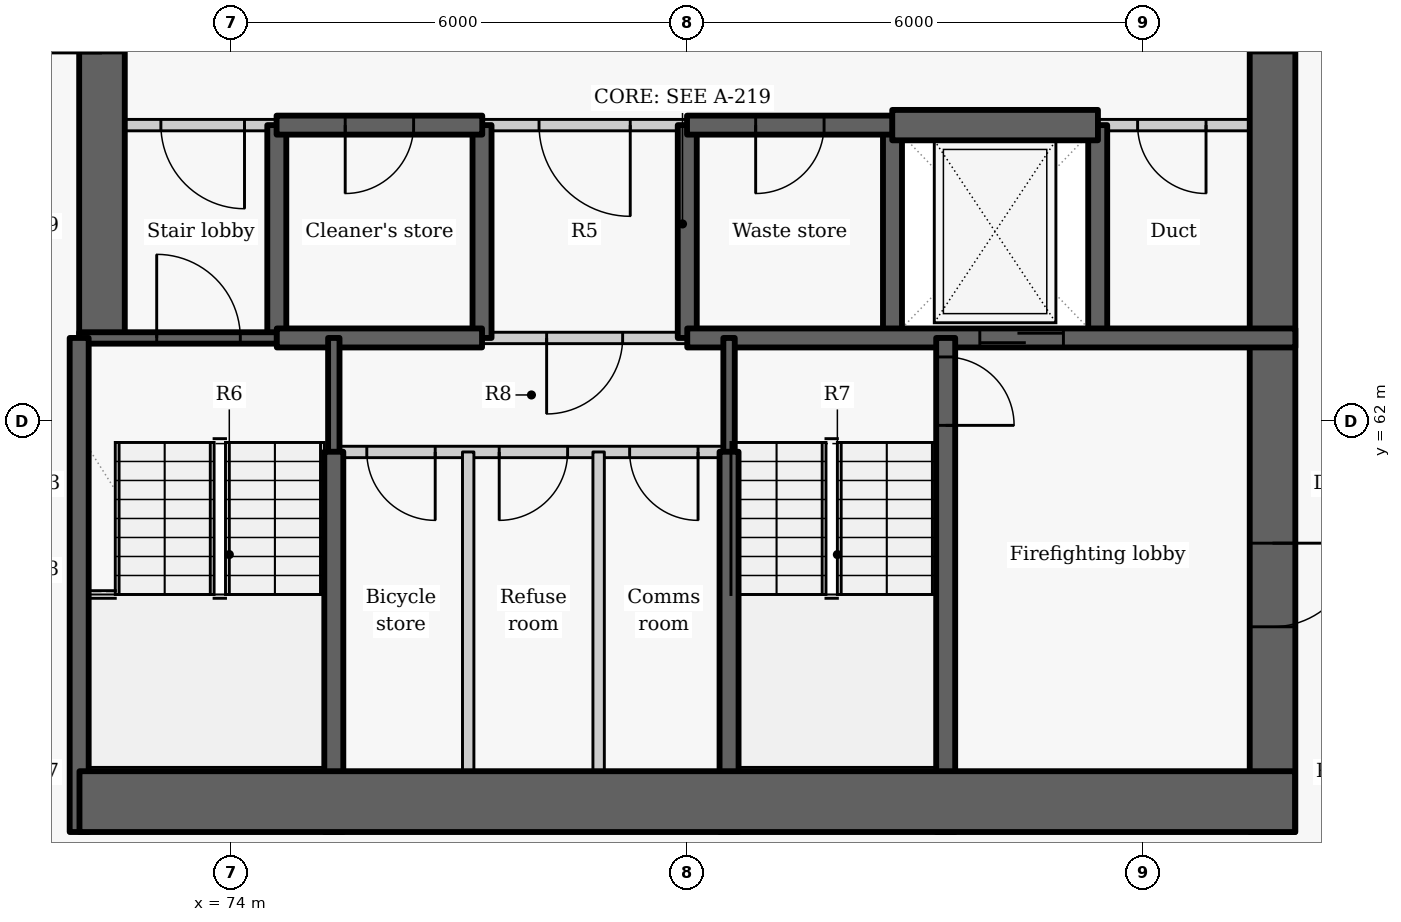
"""IFC4 building model, lengths in metres.
Left out: names, types, materials, properties, quantities, classifications, styles, units other than length and angle.
Written with IfcOpenShell. Run it as: python <this file> out.ifc"""

import sys

from ifc_helpers import new_model, si_unit, direction, frame, frame_2d, origin, place, context, subcontext, project, spatial, rectangle, extrude, element, fill, save


model = new_model("IFC4")
c1 = context("Model", 3, precision=1e-05, world=origin(), true_north=direction((0.0, 1.0)))
c2 = subcontext(c1, "Body", "Model", "MODEL_VIEW")
j1 = project(units=[si_unit("LENGTHUNIT", "METRE"), si_unit("PLANEANGLEUNIT", "RADIAN")], contexts=[c1])
p1 = place(None, origin())
s1 = spatial("IfcSite", under=j1, at=p1, CompositionType="ELEMENT")
p2 = place(p1, origin())
s2 = spatial("IfcBuilding", under=s1, at=p2, CompositionType="ELEMENT")
p3 = place(p2, frame((0.0, 0.0, 97.5)))
s3 = spatial("IfcBuildingStorey", under=s2, at=p3, CompositionType="ELEMENT", Elevation=97.5)
p4 = place(p3, frame((74.6, 63.1, -0.275), z_axis=(0.0, 0.0, 1.0), x_axis=(0.0, 1.0, 0.0)))
e1 = element("IfcWall", 1, at=p4, inside=s3, PredefinedType="SHEAR", context=c2, shape_type="SweptSolid", body=[
    extrude(rectangle(XDim=2.8, YDim=0.25, at=frame_2d((1.4, 0.0))), origin(), (0.0, 0.0, 1.0), 3.3),
])
p5 = place(p3, frame((72.3, 63.1, -0.275), z_axis=(0.0, 0.0, 1.0), x_axis=(0.0, 1.0, 0.0)))
e2 = element("IfcWall", 2, at=p5, inside=s3, PredefinedType="SHEAR", context=c2, shape_type="SweptSolid", body=[
    extrude(rectangle(XDim=9.1, YDim=0.6, at=frame_2d((4.55, 0.0))), origin(), (0.0, 0.0, 1.0), 3.3),
])
p6 = place(p5, frame((3.75, 0.0, 0.275)))
e3 = element("IfcOpeningElement", 3, at=p6, cuts=e2, PredefinedType="OPENING", context=c2, shape_type="SweptSolid", body=[
    extrude(rectangle(XDim=1.5, YDim=2.1, at=frame_2d((0.75, 1.05))), frame((0.0, 0.31, 0.0), z_axis=(0.0, -1.0, 0.0), x_axis=(1.0, 0.0, 0.0)), (0.0, 0.0, 1.0), 0.62),
])
for number, where, z_axis, x_axis in (
    (4, (77.3, 63.1, -0.275), (0.0, 0.0, 1.0), (0.0, 1.0, 0.0)),
    (5, (80.0, 63.1, -0.275), (0.0, 0.0, 1.0), (0.0, 1.0, 0.0)),
    (6, (82.7, 63.1, -0.275), (0.0, 0.0, 1.0), (0.0, 1.0, 0.0)),
    (7, (85.4, 63.1, -0.275), (0.0, 0.0, 1.0), (0.0, 1.0, 0.0)),
):
    element("IfcWall", number, at=place(p3, frame(where, z_axis=z_axis, x_axis=x_axis)), inside=s3, PredefinedType="SHEAR", context=c2, shape_type="SweptSolid", body=[
        extrude(rectangle(XDim=2.8, YDim=0.25, at=frame_2d((1.4, 0.0))), origin(), (0.0, 0.0, 1.0), 3.3),
    ])
p7 = place(p3, frame((87.7, 72.2, -0.275), z_axis=(0.0, 0.0, 1.0), x_axis=(0.0, -1.0, 0.0)))
e8 = element("IfcWall", 8, at=p7, inside=s3, PredefinedType="SHEAR", context=c2, shape_type="SweptSolid", body=[
    extrude(rectangle(XDim=15.6, YDim=0.6, at=frame_2d((7.8, 0.0))), origin(), (0.0, 0.0, 1.0), 3.3),
])
p8 = place(p7, frame((3.85, 0.0, 0.275)))
e9 = element("IfcOpeningElement", 9, at=p8, cuts=e8, PredefinedType="OPENING", context=c2, shape_type="SweptSolid", body=[
    extrude(rectangle(XDim=1.5, YDim=2.1, at=frame_2d((0.75, 1.05))), frame((0.0, 0.31, 0.0), z_axis=(0.0, -1.0, 0.0), x_axis=(1.0, 0.0, 0.0)), (0.0, 0.0, 1.0), 0.62),
])
p9 = place(p7, frame((11.8, 0.0, 0.275)))
e10 = element("IfcOpeningElement", 10, at=p9, cuts=e8, PredefinedType="OPENING", context=c2, shape_type="SweptSolid", body=[
    extrude(rectangle(XDim=1.1, YDim=2.1, at=frame_2d((0.55, 1.05))), frame((0.0, 0.31, 0.0), z_axis=(0.0, -1.0, 0.0), x_axis=(1.0, 0.0, 0.0)), (0.0, 0.0, 1.0), 0.62),
])
p10 = place(p3, frame((74.603, 65.9, 0.0), z_axis=(0.0, 0.0, 1.0), x_axis=(-1.0, 0.0, 0.0)))
e11 = element("IfcWall", 11, at=p10, inside=s3, PredefinedType="PARTITIONING", context=c2, shape_type="SweptSolid", body=[
    extrude(rectangle(XDim=2.603, YDim=0.15, at=frame_2d((1.302, 0.0))), origin(), (0.0, 0.0, 1.0), 3.025),
])
p11 = place(p10, frame((0.428, 0.0, 0.0)))
e12 = element("IfcOpeningElement", 12, at=p11, cuts=e11, PredefinedType="OPENING", context=c2, shape_type="SweptSolid", body=[
    extrude(rectangle(XDim=1.1, YDim=2.1, at=frame_2d((0.55, 1.05))), frame((0.0, 0.085, 0.0), z_axis=(0.0, -1.0, 0.0), x_axis=(1.0, 0.0, 0.0)), (0.0, 0.0, 1.0), 0.17),
])
p12 = place(p3, frame((80.003, 65.9, 0.0), z_axis=(0.0, 0.0, 1.0), x_axis=(-1.0, 0.0, 0.0)))
e13 = element("IfcWall", 13, at=p12, inside=s3, PredefinedType="PARTITIONING", context=c2, shape_type="SweptSolid", body=[
    extrude(rectangle(XDim=2.706, YDim=0.15, at=frame_2d((1.353, 0.0))), origin(), (0.0, 0.0, 1.0), 3.025),
])
p13 = place(p12, frame((0.753, 0.0, 0.0)))
e14 = element("IfcOpeningElement", 14, at=p13, cuts=e13, PredefinedType="OPENING", context=c2, shape_type="SweptSolid", body=[
    extrude(rectangle(XDim=1.2, YDim=2.1, at=frame_2d((0.6, 1.05))), frame((0.0, 0.085, 0.0), z_axis=(0.0, -1.0, 0.0), x_axis=(1.0, 0.0, 0.0)), (0.0, 0.0, 1.0), 0.17),
])
p14 = place(p3, frame((88.0, 65.9, 0.0), z_axis=(0.0, 0.0, 1.0), x_axis=(-1.0, 0.0, 0.0)))
e15 = element("IfcWall", 15, at=p14, inside=s3, PredefinedType="PARTITIONING", context=c2, shape_type="SweptSolid", body=[
    extrude(rectangle(XDim=2.603, YDim=0.15, at=frame_2d((1.302, 0.0))), origin(), (0.0, 0.0, 1.0), 3.025),
])
p15 = place(p14, frame((1.175, 0.0, 0.0)))
e16 = element("IfcOpeningElement", 16, at=p15, cuts=e15, PredefinedType="OPENING", context=c2, shape_type="SweptSolid", body=[
    extrude(rectangle(XDim=0.9, YDim=2.1, at=frame_2d((0.45, 1.05))), frame((0.0, 0.085, 0.0), z_axis=(0.0, -1.0, 0.0), x_axis=(1.0, 0.0, 0.0)), (0.0, 0.0, 1.0), 0.17),
])
p16 = place(p3, frame((77.303, 65.9, -0.275), z_axis=(0.0, 0.0, 1.0), x_axis=(-1.0, 0.0, 0.0)))
e17 = element("IfcWall", 17, at=p16, inside=s3, PredefinedType="SHEAR", context=c2, shape_type="SweptSolid", body=[
    extrude(rectangle(XDim=2.706, YDim=0.25, at=frame_2d((1.353, 0.0))), origin(), (0.0, 0.0, 1.0), 3.3),
])
p17 = place(p16, frame((0.903, 0.0, 0.275)))
e18 = element("IfcOpeningElement", 18, at=p17, cuts=e17, PredefinedType="OPENING", context=c2, shape_type="SweptSolid", body=[
    extrude(rectangle(XDim=0.9, YDim=2.1, at=frame_2d((0.45, 1.05))), frame((0.0, 0.135, 0.0), z_axis=(0.0, -1.0, 0.0), x_axis=(1.0, 0.0, 0.0)), (0.0, 0.0, 1.0), 0.27),
])
p18 = place(p3, frame((82.703, 65.9, -0.275), z_axis=(0.0, 0.0, 1.0), x_axis=(-1.0, 0.0, 0.0)))
e19 = element("IfcWall", 19, at=p18, inside=s3, PredefinedType="SHEAR", context=c2, shape_type="SweptSolid", body=[
    extrude(rectangle(XDim=2.706, YDim=0.25, at=frame_2d((1.353, 0.0))), origin(), (0.0, 0.0, 1.0), 3.3),
])
p19 = place(p18, frame((0.903, 0.0, 0.275)))
e20 = element("IfcOpeningElement", 20, at=p19, cuts=e19, PredefinedType="OPENING", context=c2, shape_type="SweptSolid", body=[
    extrude(rectangle(XDim=0.9, YDim=2.1, at=frame_2d((0.45, 1.05))), frame((0.0, 0.135, 0.0), z_axis=(0.0, -1.0, 0.0), x_axis=(1.0, 0.0, 0.0)), (0.0, 0.0, 1.0), 0.27),
])
p20 = place(p3, frame((82.697, 65.9, -0.275), z_axis=(0.0, 0.0, 1.0), x_axis=(1.0, 0.0, 0.0)))
e21 = element("IfcWall", 21, at=p20, inside=s3, PredefinedType="SHEAR", context=c2, shape_type="SweptSolid", body=[
    extrude(rectangle(XDim=2.706, YDim=0.4, at=frame_2d((1.353, 0.0))), origin(), (0.0, 0.0, 1.0), 3.3),
])
p21 = place(p3, frame((72.0, 63.1, -0.275), z_axis=(0.0, 0.0, 1.0), x_axis=(1.0, 0.0, 0.0)))
e22 = element("IfcWall", 22, at=p21, inside=s3, PredefinedType="SHEAR", context=c2, shape_type="SweptSolid", body=[
    extrude(rectangle(XDim=2.6, YDim=0.15, at=frame_2d((1.3, 0.0))), origin(), (0.0, 0.0, 1.0), 3.3),
])
p22 = place(p21, frame((1.02, 0.0, 0.275)))
e23 = element("IfcOpeningElement", 23, at=p22, cuts=e22, PredefinedType="OPENING", context=c2, shape_type="SweptSolid", body=[
    extrude(rectangle(XDim=1.1, YDim=2.1, at=frame_2d((0.55, 1.05))), frame((0.0, 0.085, 0.0), z_axis=(0.0, -1.0, 0.0), x_axis=(1.0, 0.0, 0.0)), (0.0, 0.0, 1.0), 0.17),
])
p23 = place(p3, frame((74.6, 63.1, -0.275), z_axis=(0.0, 0.0, 1.0), x_axis=(1.0, 0.0, 0.0)))
e24 = element("IfcWall", 24, at=p23, inside=s3, PredefinedType="SHEAR", context=c2, shape_type="SweptSolid", body=[
    extrude(rectangle(XDim=2.7, YDim=0.25, at=frame_2d((1.35, 0.0))), origin(), (0.0, 0.0, 1.0), 3.3),
])
p24 = place(p3, frame((80.0, 63.1, -0.275), z_axis=(0.0, 0.0, 1.0), x_axis=(1.0, 0.0, 0.0)))
e25 = element("IfcWall", 25, at=p24, inside=s3, PredefinedType="SHEAR", context=c2, shape_type="SweptSolid", body=[
    extrude(rectangle(XDim=8.0, YDim=0.25, at=frame_2d((4.0, 0.0))), origin(), (0.0, 0.0, 1.0), 3.3),
])
p25 = place(p24, frame((3.849, 0.0, 0.275)))
e26 = element("IfcOpeningElement", 26, at=p25, cuts=e25, PredefinedType="OPENING", context=c2, shape_type="SweptSolid", body=[
    extrude(rectangle(XDim=1.1, YDim=2.1, at=frame_2d((0.55, 1.05))), frame((0.0, 0.135, 0.0), z_axis=(0.0, -1.0, 0.0), x_axis=(1.0, 0.0, 0.0)), (0.0, 0.0, 1.0), 0.27),
])
p26 = place(p3, frame((80.0, 63.1, 0.0), z_axis=(0.0, 0.0, 1.0), x_axis=(-1.0, 0.0, 0.0)))
e27 = element("IfcWall", 27, at=p26, inside=s3, PredefinedType="PARTITIONING", context=c2, shape_type="SweptSolid", body=[
    extrude(rectangle(XDim=2.7, YDim=0.15, at=frame_2d((1.35, 0.0))), origin(), (0.0, 0.0, 1.0), 3.025),
])
p27 = place(p26, frame((0.85, 0.0, 0.0)))
e28 = element("IfcOpeningElement", 28, at=p27, cuts=e27, PredefinedType="OPENING", context=c2, shape_type="SweptSolid", body=[
    extrude(rectangle(XDim=1.0, YDim=2.1, at=frame_2d((0.5, 1.05))), frame((0.0, 0.085, 0.0), z_axis=(0.0, -1.0, 0.0), x_axis=(1.0, 0.0, 0.0)), (0.0, 0.0, 1.0), 0.17),
])
p28 = place(p3, frame((75.35, 61.597, -0.275), z_axis=(0.0, 0.0, 1.0), x_axis=(0.0, 1.0, 0.0)))
e29 = element("IfcWall", 29, at=p28, inside=s3, PredefinedType="SHEAR", context=c2, shape_type="SweptSolid", body=[
    extrude(rectangle(XDim=1.503, YDim=0.15, at=frame_2d((0.751, 0.0))), origin(), (0.0, 0.0, 1.0), 3.3),
])
p29 = place(p3, frame((75.35, 56.6, -0.275), z_axis=(0.0, 0.0, 1.0), x_axis=(0.0, 1.0, 0.0)))
e30 = element("IfcWall", 30, at=p29, inside=s3, PredefinedType="SHEAR", context=c2, shape_type="SweptSolid", body=[
    extrude(rectangle(XDim=5.003, YDim=0.25, at=frame_2d((2.501, 0.0))), origin(), (0.0, 0.0, 1.0), 3.3),
])
p30 = place(p3, frame((72.0, 56.6, -0.275), z_axis=(0.0, 0.0, 1.0), x_axis=(0.0, 1.0, 0.0)))
e31 = element("IfcWall", 31, at=p30, inside=s3, PredefinedType="SHEAR", context=c2, shape_type="SweptSolid", body=[
    extrude(rectangle(XDim=6.5, YDim=0.25, at=frame_2d((3.25, 0.0))), origin(), (0.0, 0.0, 1.0), 3.3),
])
p31 = place(p3, frame((83.4, 63.1, -0.275), z_axis=(0.0, 0.0, 1.0), x_axis=(0.0, -1.0, 0.0)))
e32 = element("IfcWall", 32, at=p31, inside=s3, PredefinedType="SHEAR", context=c2, shape_type="SweptSolid", body=[
    extrude(rectangle(XDim=6.5, YDim=0.25, at=frame_2d((3.25, 0.0))), origin(), (0.0, 0.0, 1.0), 3.3),
])
p32 = place(p31, frame((0.25, 0.0, 0.275)))
e33 = element("IfcOpeningElement", 33, at=p32, cuts=e32, PredefinedType="OPENING", context=c2, shape_type="SweptSolid", body=[
    extrude(rectangle(XDim=0.9, YDim=2.1, at=frame_2d((0.45, 1.05))), frame((0.0, 0.135, 0.0), z_axis=(0.0, -1.0, 0.0), x_axis=(1.0, 0.0, 0.0)), (0.0, 0.0, 1.0), 0.27),
])
p33 = place(p3, frame((80.55, 61.597, -0.275), z_axis=(0.0, 0.0, 1.0), x_axis=(0.0, 1.0, 0.0)))
e34 = element("IfcWall", 34, at=p33, inside=s3, PredefinedType="SHEAR", context=c2, shape_type="SweptSolid", body=[
    extrude(rectangle(XDim=1.503, YDim=0.15, at=frame_2d((0.751, 0.0))), origin(), (0.0, 0.0, 1.0), 3.3),
])
p34 = place(p3, frame((80.55, 56.6, -0.275), z_axis=(0.0, 0.0, 1.0), x_axis=(0.0, 1.0, 0.0)))
e35 = element("IfcWall", 35, at=p34, inside=s3, PredefinedType="SHEAR", context=c2, shape_type="SweptSolid", body=[
    extrude(rectangle(XDim=5.003, YDim=0.25, at=frame_2d((2.501, 0.0))), origin(), (0.0, 0.0, 1.0), 3.3),
])
p35 = place(p3, frame((80.55, 61.6, 0.0), z_axis=(0.0, 0.0, 1.0), x_axis=(-1.0, 0.0, 0.0)))
e36 = element("IfcWall", 36, at=p35, inside=s3, PredefinedType="PARTITIONING", context=c2, shape_type="SweptSolid", body=[
    extrude(rectangle(XDim=5.2, YDim=0.15, at=frame_2d((2.6, 0.0))), origin(), (0.0, 0.0, 1.0), 3.025),
])
p36 = place(p35, frame((3.866, 0.0, 0.0)))
e37 = element("IfcOpeningElement", 37, at=p36, cuts=e36, PredefinedType="OPENING", context=c2, shape_type="SweptSolid", body=[
    extrude(rectangle(XDim=0.9, YDim=2.1, at=frame_2d((0.45, 1.05))), frame((0.0, 0.085, 0.0), z_axis=(0.0, -1.0, 0.0), x_axis=(1.0, 0.0, 0.0)), (0.0, 0.0, 1.0), 0.17),
])
p37 = place(p35, frame((2.124, 0.0, 0.0)))
e38 = element("IfcOpeningElement", 38, at=p37, cuts=e36, PredefinedType="OPENING", context=c2, shape_type="SweptSolid", body=[
    extrude(rectangle(XDim=0.9, YDim=2.1, at=frame_2d((0.45, 1.05))), frame((0.0, 0.085, 0.0), z_axis=(0.0, -1.0, 0.0), x_axis=(1.0, 0.0, 0.0)), (0.0, 0.0, 1.0), 0.17),
])
p38 = place(p35, frame((0.408, 0.0, 0.0)))
e39 = element("IfcOpeningElement", 39, at=p38, cuts=e36, PredefinedType="OPENING", context=c2, shape_type="SweptSolid", body=[
    extrude(rectangle(XDim=0.9, YDim=2.1, at=frame_2d((0.45, 1.05))), frame((0.0, 0.085, 0.0), z_axis=(0.0, -1.0, 0.0), x_axis=(1.0, 0.0, 0.0)), (0.0, 0.0, 1.0), 0.17),
])
for number, where, z_axis, x_axis in (
    (40, (77.118, 56.6, 0.0), (0.0, 0.0, 1.0), (0.0, 1.0, 0.0)),
    (41, (78.834, 56.6, 0.0), (0.0, 0.0, 1.0), (0.0, 1.0, 0.0)),
):
    element("IfcWall", number, at=place(p3, frame(where, z_axis=z_axis, x_axis=x_axis)), inside=s3, PredefinedType="PARTITIONING", context=c2, shape_type="SweptSolid", body=[
        extrude(rectangle(XDim=5.0, YDim=0.15, at=frame_2d((2.5, 0.0))), origin(), (0.0, 0.0, 1.0), 3.025),
    ])
p39 = place(p3, frame((72.004, 57.0, -0.275), z_axis=(0.0, 0.0, 1.0), x_axis=(1.0, 0.0, 0.0)))
e42 = element("IfcWall", 42, at=p39, inside=s3, PredefinedType="SHEAR", context=c2, shape_type="SweptSolid", body=[
    extrude(rectangle(XDim=15.992, YDim=0.8, at=frame_2d((7.996, 0.0))), origin(), (0.0, 0.0, 1.0), 3.3),
])
p40 = place(p11, origin())
e43 = element("IfcDoor", 43, at=p40, inside=s3, OperationType="SINGLE_SWING_LEFT", PredefinedType="DOOR", context=c2, shape_type="SweptSolid", body=[
    extrude(rectangle(XDim=1.1, YDim=2.1, at=frame_2d((0.55, 1.05))), frame((0.0, 0.025, 0.0), z_axis=(0.0, -1.0, 0.0), x_axis=(1.0, 0.0, 0.0)), (0.0, 0.0, 1.0), 0.05),
])
fill(e12, e43)
p41 = place(p17, origin())
e44 = element("IfcDoor", 44, at=p41, inside=s3, OperationType="SINGLE_SWING_RIGHT", PredefinedType="DOOR", context=c2, shape_type="SweptSolid", body=[
    extrude(rectangle(XDim=0.9, YDim=2.1, at=frame_2d((0.45, 1.05))), frame((0.0, 0.025, 0.0), z_axis=(0.0, -1.0, 0.0), x_axis=(1.0, 0.0, 0.0)), (0.0, 0.0, 1.0), 0.05),
])
fill(e18, e44)
p42 = place(p13, origin())
e45 = element("IfcDoor", 45, at=p42, inside=s3, OperationType="DOUBLE_DOOR_SINGLE_SWING", PredefinedType="DOOR", context=c2, shape_type="SweptSolid", body=[
    extrude(rectangle(XDim=1.2, YDim=2.1, at=frame_2d((0.6, 1.05))), frame((0.0, 0.025, 0.0), z_axis=(0.0, -1.0, 0.0), x_axis=(1.0, 0.0, 0.0)), (0.0, 0.0, 1.0), 0.05),
])
fill(e14, e45)
p43 = place(p19, origin())
e46 = element("IfcDoor", 46, at=p43, inside=s3, OperationType="SINGLE_SWING_RIGHT", PredefinedType="DOOR", context=c2, shape_type="SweptSolid", body=[
    extrude(rectangle(XDim=0.9, YDim=2.1, at=frame_2d((0.45, 1.05))), frame((0.0, 0.025, 0.0), z_axis=(0.0, -1.0, 0.0), x_axis=(1.0, 0.0, 0.0)), (0.0, 0.0, 1.0), 0.05),
])
fill(e20, e46)
p44 = place(p25, origin())
e47 = element("IfcDoor", 47, at=p44, inside=s3, OperationType="SLIDING_TO_LEFT", PredefinedType="DOOR", context=c2, shape_type="SweptSolid", body=[
    extrude(rectangle(XDim=1.1, YDim=2.1, at=frame_2d((0.55, 1.05))), frame((0.0, 0.025, 0.0), z_axis=(0.0, -1.0, 0.0), x_axis=(1.0, 0.0, 0.0)), (0.0, 0.0, 1.0), 0.05),
])
fill(e26, e47)
p45 = place(p15, origin())
e48 = element("IfcDoor", 48, at=p45, inside=s3, OperationType="SINGLE_SWING_LEFT", PredefinedType="DOOR", context=c2, shape_type="SweptSolid", body=[
    extrude(rectangle(XDim=0.9, YDim=2.1, at=frame_2d((0.45, 1.05))), frame((0.0, 0.025, 0.0), z_axis=(0.0, -1.0, 0.0), x_axis=(1.0, 0.0, 0.0)), (0.0, 0.0, 1.0), 0.05),
])
fill(e16, e48)
p46 = place(p27, origin())
e49 = element("IfcDoor", 49, at=p46, inside=s3, OperationType="SINGLE_SWING_RIGHT", PredefinedType="DOOR", context=c2, shape_type="SweptSolid", body=[
    extrude(rectangle(XDim=1.0, YDim=2.1, at=frame_2d((0.5, 1.05))), frame((0.0, 0.025, 0.0), z_axis=(0.0, -1.0, 0.0), x_axis=(1.0, 0.0, 0.0)), (0.0, 0.0, 1.0), 0.05),
])
fill(e28, e49)
p47 = place(p36, origin())
e50 = element("IfcDoor", 50, at=p47, inside=s3, OperationType="SINGLE_SWING_LEFT", PredefinedType="DOOR", context=c2, shape_type="SweptSolid", body=[
    extrude(rectangle(XDim=0.9, YDim=2.1, at=frame_2d((0.45, 1.05))), frame((0.0, 0.025, 0.0), z_axis=(0.0, -1.0, 0.0), x_axis=(1.0, 0.0, 0.0)), (0.0, 0.0, 1.0), 0.05),
])
fill(e37, e50)
p48 = place(p37, origin())
e51 = element("IfcDoor", 51, at=p48, inside=s3, OperationType="SINGLE_SWING_RIGHT", PredefinedType="DOOR", context=c2, shape_type="SweptSolid", body=[
    extrude(rectangle(XDim=0.9, YDim=2.1, at=frame_2d((0.45, 1.05))), frame((0.0, 0.025, 0.0), z_axis=(0.0, -1.0, 0.0), x_axis=(1.0, 0.0, 0.0)), (0.0, 0.0, 1.0), 0.05),
])
fill(e38, e51)
p49 = place(p38, origin())
e52 = element("IfcDoor", 52, at=p49, inside=s3, OperationType="SINGLE_SWING_LEFT", PredefinedType="DOOR", context=c2, shape_type="SweptSolid", body=[
    extrude(rectangle(XDim=0.9, YDim=2.1, at=frame_2d((0.45, 1.05))), frame((0.0, 0.025, 0.0), z_axis=(0.0, -1.0, 0.0), x_axis=(1.0, 0.0, 0.0)), (0.0, 0.0, 1.0), 0.05),
])
fill(e39, e52)
p50 = place(p22, origin())
e53 = element("IfcDoor", 53, at=p50, inside=s3, OperationType="SINGLE_SWING_LEFT", PredefinedType="DOOR", context=c2, shape_type="SweptSolid", body=[
    extrude(rectangle(XDim=1.1, YDim=2.1, at=frame_2d((0.55, 1.05))), frame((0.0, 0.025, 0.0), z_axis=(0.0, -1.0, 0.0), x_axis=(1.0, 0.0, 0.0)), (0.0, 0.0, 1.0), 0.05),
])
fill(e23, e53)
p51 = place(p32, origin())
e54 = element("IfcDoor", 54, at=p51, inside=s3, OperationType="SINGLE_SWING_RIGHT", PredefinedType="DOOR", context=c2, shape_type="SweptSolid", body=[
    extrude(rectangle(XDim=0.9, YDim=2.1, at=frame_2d((0.45, 1.05))), frame((0.0, 0.025, 0.0), z_axis=(0.0, -1.0, 0.0), x_axis=(1.0, 0.0, 0.0)), (0.0, 0.0, 1.0), 0.05),
])
fill(e33, e54)
p52 = place(p8, origin())
e55 = element("IfcDoor", 55, at=p52, inside=s3, OperationType="DOUBLE_DOOR_SINGLE_SWING", PredefinedType="DOOR", context=c2, shape_type="SweptSolid", body=[
    extrude(rectangle(XDim=1.5, YDim=2.1, at=frame_2d((0.75, 1.05))), frame((0.0, 0.025, 0.0), z_axis=(0.0, -1.0, 0.0), x_axis=(1.0, 0.0, 0.0)), (0.0, 0.0, 1.0), 0.05),
])
fill(e9, e55)
p53 = place(p9, origin())
e56 = element("IfcDoor", 56, at=p53, inside=s3, OperationType="SINGLE_SWING_LEFT", PredefinedType="DOOR", context=c2, shape_type="SweptSolid", body=[
    extrude(rectangle(XDim=1.1, YDim=2.1, at=frame_2d((0.55, 1.05))), frame((0.0, 0.025, 0.0), z_axis=(0.0, -1.0, 0.0), x_axis=(1.0, 0.0, 0.0)), (0.0, 0.0, 1.0), 0.05),
])
fill(e10, e56)
save(model, sys.argv[1])
